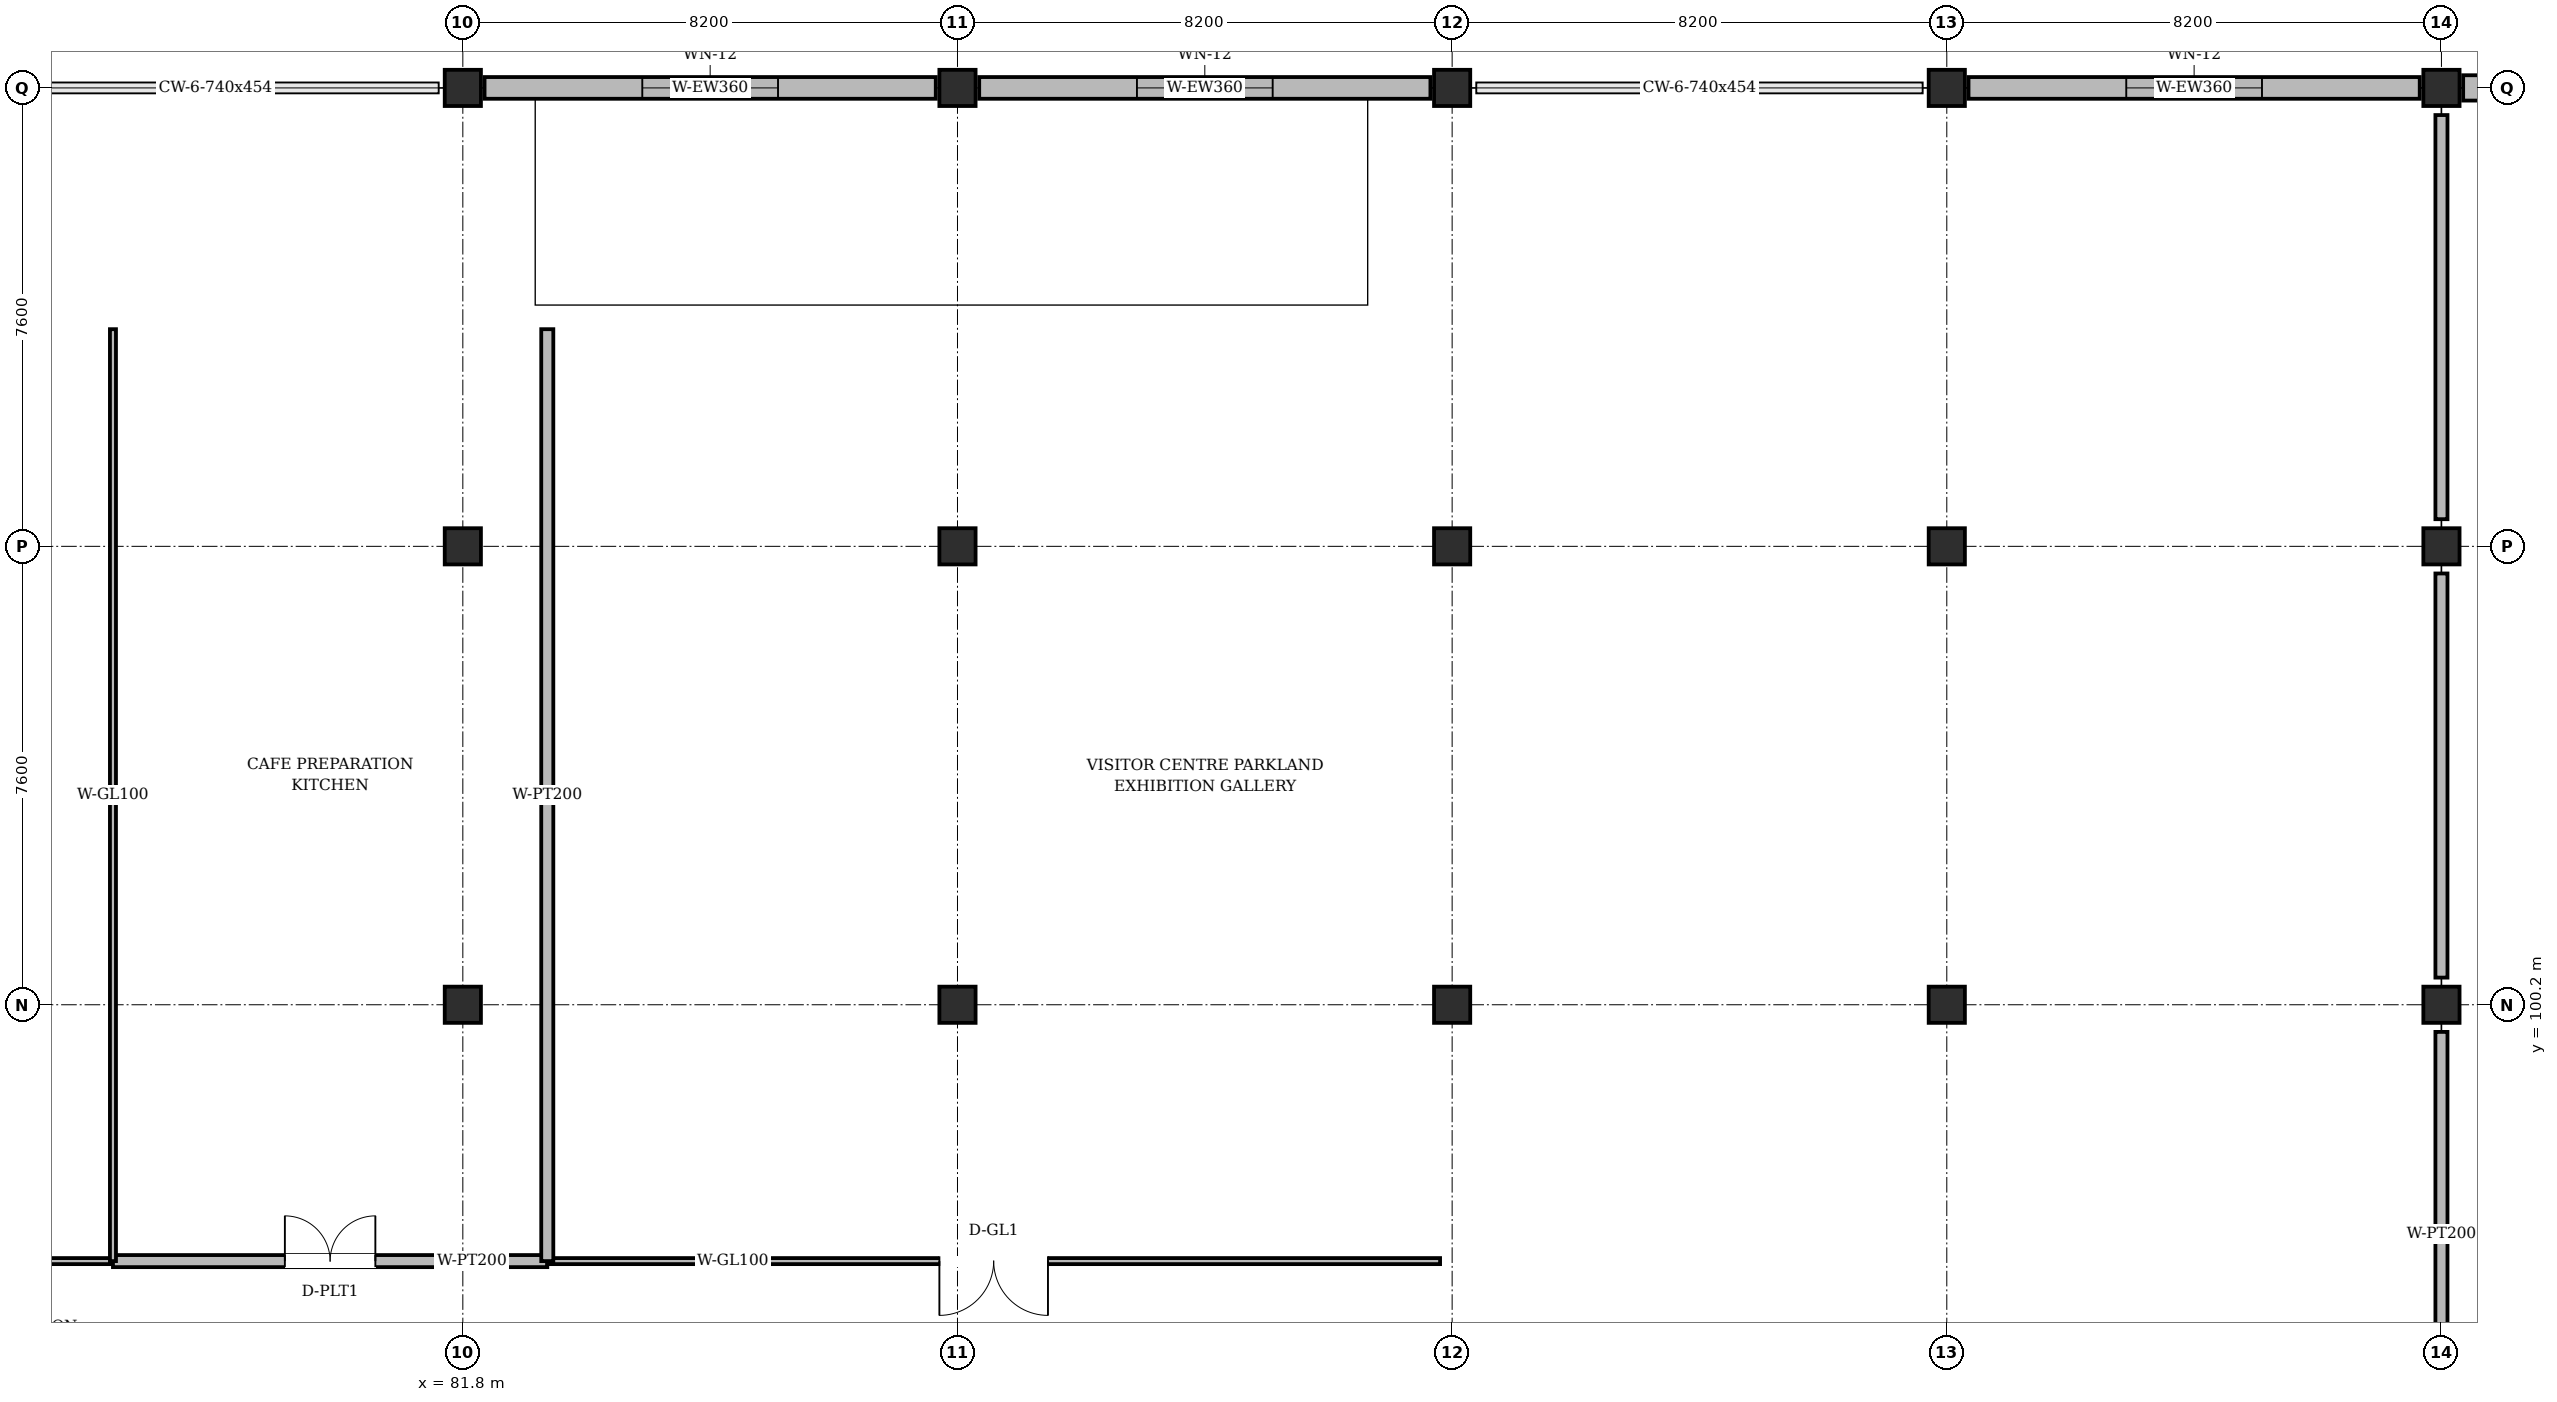
"""IFC4 building model, lengths in metres.
Left out: names, types, materials, properties, quantities, classifications, styles, units other than length and angle.
Written with IfcOpenShell. Run it as: python <this file> out.ifc"""

import sys

from ifc_helpers import new_model, si_unit, direction, frame, frame_2d, origin, origin_2d, place, context, subcontext, project, spatial, rectangle, extrude, element, fill, save


model = new_model("IFC4")
c1 = context("Model", 3, precision=1e-05, world=origin(), true_north=direction((0.0, 1.0)))
c2 = subcontext(c1, "Body", "Model", "MODEL_VIEW")
j1 = project(units=[si_unit("LENGTHUNIT", "METRE"), si_unit("PLANEANGLEUNIT", "RADIAN")], contexts=[c1])
p1 = place(None, origin())
s1 = spatial("IfcSite", under=j1, at=p1, CompositionType="ELEMENT")
p2 = place(p1, origin())
s2 = spatial("IfcBuilding", under=s1, at=p2, CompositionType="ELEMENT")
p3 = place(p2, origin())
s3 = spatial("IfcBuildingStorey", under=s2, at=p3, CompositionType="ELEMENT", Elevation=0.0)
for number, where, z_axis, x_axis in (
    (1, (81.8, 100.2, 0.0), (0.0, 0.0, 1.0), (1.0, 0.0, 0.0)),
    (2, (81.8, 107.8, 0.0), (0.0, 0.0, 1.0), (1.0, 0.0, 0.0)),
):
    element("IfcColumn", number, at=place(p3, frame(where, z_axis=z_axis, x_axis=x_axis)), inside=s3, PredefinedType="COLUMN", context=c2, shape_type="SweptSolid", body=[
        extrude(rectangle(XDim=0.6, YDim=0.6, at=origin_2d()), origin(), (0.0, 0.0, 1.0), 5.1),
    ])
p4 = place(p3, frame((81.8, 115.4, 0.0), z_axis=(0.0, 0.0, 1.0), x_axis=(1.0, 0.0, 0.0)))
e3 = element("IfcColumn", 3, at=p4, inside=s3, PredefinedType="COLUMN", context=c2, shape_type="SweptSolid", body=[
    extrude(rectangle(XDim=0.6, YDim=0.6, at=origin_2d()), origin(), (0.0, 0.0, 1.0), 5.145),
])
for number, where, z_axis, x_axis in (
    (4, (90.0, 100.2, 0.0), (0.0, 0.0, 1.0), (1.0, 0.0, 0.0)),
    (5, (90.0, 107.8, 0.0), (0.0, 0.0, 1.0), (1.0, 0.0, 0.0)),
):
    element("IfcColumn", number, at=place(p3, frame(where, z_axis=z_axis, x_axis=x_axis)), inside=s3, PredefinedType="COLUMN", context=c2, shape_type="SweptSolid", body=[
        extrude(rectangle(XDim=0.6, YDim=0.6, at=origin_2d()), origin(), (0.0, 0.0, 1.0), 5.1),
    ])
p5 = place(p3, frame((90.0, 115.4, 0.0), z_axis=(0.0, 0.0, 1.0), x_axis=(1.0, 0.0, 0.0)))
e6 = element("IfcColumn", 6, at=p5, inside=s3, PredefinedType="COLUMN", context=c2, shape_type="SweptSolid", body=[
    extrude(rectangle(XDim=0.6, YDim=0.6, at=origin_2d()), origin(), (0.0, 0.0, 1.0), 5.145),
])
for number, where, z_axis, x_axis in (
    (7, (98.2, 100.2, 0.0), (0.0, 0.0, 1.0), (1.0, 0.0, 0.0)),
    (8, (98.2, 107.8, 0.0), (0.0, 0.0, 1.0), (1.0, 0.0, 0.0)),
):
    element("IfcColumn", number, at=place(p3, frame(where, z_axis=z_axis, x_axis=x_axis)), inside=s3, PredefinedType="COLUMN", context=c2, shape_type="SweptSolid", body=[
        extrude(rectangle(XDim=0.6, YDim=0.6, at=origin_2d()), origin(), (0.0, 0.0, 1.0), 5.1),
    ])
p6 = place(p3, frame((98.2, 115.4, 0.0), z_axis=(0.0, 0.0, 1.0), x_axis=(1.0, 0.0, 0.0)))
e9 = element("IfcColumn", 9, at=p6, inside=s3, PredefinedType="COLUMN", context=c2, shape_type="SweptSolid", body=[
    extrude(rectangle(XDim=0.6, YDim=0.6, at=origin_2d()), origin(), (0.0, 0.0, 1.0), 5.145),
])
for number, where, z_axis, x_axis in (
    (10, (106.4, 100.2, 0.0), (0.0, 0.0, 1.0), (1.0, 0.0, 0.0)),
    (11, (106.4, 107.8, 0.0), (0.0, 0.0, 1.0), (1.0, 0.0, 0.0)),
):
    element("IfcColumn", number, at=place(p3, frame(where, z_axis=z_axis, x_axis=x_axis)), inside=s3, PredefinedType="COLUMN", context=c2, shape_type="SweptSolid", body=[
        extrude(rectangle(XDim=0.6, YDim=0.6, at=origin_2d()), origin(), (0.0, 0.0, 1.0), 5.1),
    ])
p7 = place(p3, frame((106.4, 115.4, 0.0), z_axis=(0.0, 0.0, 1.0), x_axis=(1.0, 0.0, 0.0)))
e12 = element("IfcColumn", 12, at=p7, inside=s3, PredefinedType="COLUMN", context=c2, shape_type="SweptSolid", body=[
    extrude(rectangle(XDim=0.6, YDim=0.6, at=origin_2d()), origin(), (0.0, 0.0, 1.0), 5.145),
])
p8 = place(p3, frame((114.6, 100.2, 0.0), z_axis=(0.0, 0.0, 1.0), x_axis=(1.0, 0.0, 0.0)))
e13 = element("IfcColumn", 13, at=p8, inside=s3, PredefinedType="COLUMN", context=c2, shape_type="SweptSolid", body=[
    extrude(rectangle(XDim=0.6, YDim=0.6, at=origin_2d()), origin(), (0.0, 0.0, 1.0), 5.1),
])
for number, where, z_axis, x_axis in (
    (14, (114.6, 107.8, 0.0), (0.0, 0.0, 1.0), (1.0, 0.0, 0.0)),
    (15, (114.6, 115.4, 0.0), (0.0, 0.0, 1.0), (1.0, 0.0, 0.0)),
):
    element("IfcColumn", number, at=place(p3, frame(where, z_axis=z_axis, x_axis=x_axis)), inside=s3, PredefinedType="COLUMN", context=c2, shape_type="SweptSolid", body=[
        extrude(rectangle(XDim=0.6, YDim=0.6, at=origin_2d()), origin(), (0.0, 0.0, 1.0), 5.145),
    ])
p9 = place(p3, frame((114.24, 115.4, 0.0), z_axis=(0.0, 0.0, 1.0), x_axis=(-1.0, 0.0, 0.0)))
e16 = element("IfcWall", 16, at=p9, inside=s3, PredefinedType="SOLIDWALL", context=c2, shape_type="SweptSolid", body=[
    extrude(rectangle(XDim=7.48, YDim=0.36, at=frame_2d((3.74, 0.0))), origin(), (0.0, 0.0, 1.0), 4.465),
])
p10 = place(p9, frame((2.615, 0.0, 0.95)))
e17 = element("IfcOpeningElement", 17, at=p10, cuts=e16, PredefinedType="OPENING", context=c2, shape_type="SweptSolid", body=[
    extrude(rectangle(XDim=2.25, YDim=2.1, at=frame_2d((1.125, 1.05))), frame((0.0, 0.192, 0.0), z_axis=(0.0, -1.0, 0.0), x_axis=(1.0, 0.0, 0.0)), (0.0, 0.0, 1.0), 0.384),
])
p11 = place(p3, frame((97.84, 115.4, 0.0), z_axis=(0.0, 0.0, 1.0), x_axis=(-1.0, 0.0, 0.0)))
e18 = element("IfcWall", 18, at=p11, inside=s3, PredefinedType="SOLIDWALL", context=c2, shape_type="SweptSolid", body=[
    extrude(rectangle(XDim=7.48, YDim=0.36, at=frame_2d((3.74, 0.0))), origin(), (0.0, 0.0, 1.0), 4.465),
])
p12 = place(p11, frame((2.615, 0.0, 0.95)))
e19 = element("IfcOpeningElement", 19, at=p12, cuts=e18, PredefinedType="OPENING", context=c2, shape_type="SweptSolid", body=[
    extrude(rectangle(XDim=2.25, YDim=2.1, at=frame_2d((1.125, 1.05))), frame((0.0, 0.192, 0.0), z_axis=(0.0, -1.0, 0.0), x_axis=(1.0, 0.0, 0.0)), (0.0, 0.0, 1.0), 0.384),
])
p13 = place(p3, frame((89.64, 115.4, 0.0), z_axis=(0.0, 0.0, 1.0), x_axis=(-1.0, 0.0, 0.0)))
e20 = element("IfcWall", 20, at=p13, inside=s3, PredefinedType="SOLIDWALL", context=c2, shape_type="SweptSolid", body=[
    extrude(rectangle(XDim=7.48, YDim=0.36, at=frame_2d((3.74, 0.0))), origin(), (0.0, 0.0, 1.0), 4.465),
])
p14 = place(p13, frame((2.615, 0.0, 0.95)))
e21 = element("IfcOpeningElement", 21, at=p14, cuts=e20, PredefinedType="OPENING", context=c2, shape_type="SweptSolid", body=[
    extrude(rectangle(XDim=2.25, YDim=2.1, at=frame_2d((1.125, 1.05))), frame((0.0, 0.192, 0.0), z_axis=(0.0, -1.0, 0.0), x_axis=(1.0, 0.0, 0.0)), (0.0, 0.0, 1.0), 0.384),
])
p15 = place(p3, frame((122.44, 115.4, 0.0), z_axis=(0.0, 0.0, 1.0), x_axis=(-1.0, 0.0, 0.0)))
e22 = element("IfcWall", 22, at=p15, inside=s3, PredefinedType="SOLIDWALL", context=c2, shape_type="SweptSolid", body=[
    extrude(rectangle(XDim=7.48, YDim=0.42, at=frame_2d((3.74, 0.0))), origin(), (0.0, 0.0, 1.0), 4.53),
])
p16 = place(p15, frame((2.415, 0.0, 0.95)))
e23 = element("IfcOpeningElement", 23, at=p16, cuts=e22, PredefinedType="OPENING", context=c2, shape_type="SweptSolid", body=[
    extrude(rectangle(XDim=2.65, YDim=1.5, at=frame_2d((1.325, 0.75))), frame((0.0, 0.222, 0.0), z_axis=(0.0, -1.0, 0.0), x_axis=(1.0, 0.0, 0.0)), (0.0, 0.0, 1.0), 0.444),
])
p17 = place(p3, frame((114.6, 93.05, 0.0), z_axis=(0.0, 0.0, 1.0), x_axis=(0.0, 1.0, 0.0)))
e24 = element("IfcWall", 24, at=p17, inside=s3, PredefinedType="PARTITIONING", context=c2, shape_type="SweptSolid", body=[
    extrude(rectangle(XDim=6.7, YDim=0.2, at=frame_2d((3.35, 0.0))), origin(), (0.0, 0.0, 1.0), 4.335),
])
p18 = place(p3, frame((114.6, 100.65, 0.0), z_axis=(0.0, 0.0, 1.0), x_axis=(0.0, 1.0, 0.0)))
e25 = element("IfcWall", 25, at=p18, inside=s3, PredefinedType="PARTITIONING", context=c2, shape_type="SweptSolid", body=[
    extrude(rectangle(XDim=6.7, YDim=0.2, at=frame_2d((3.35, 0.0))), origin(), (0.0, 0.0, 1.0), 4.335),
])
p19 = place(p3, frame((114.6, 108.25, 0.0), z_axis=(0.0, 0.0, 1.0), x_axis=(0.0, 1.0, 0.0)))
e26 = element("IfcWall", 26, at=p19, inside=s3, PredefinedType="PARTITIONING", context=c2, shape_type="SweptSolid", body=[
    extrude(rectangle(XDim=6.7, YDim=0.2, at=frame_2d((3.35, 0.0))), origin(), (0.0, 0.0, 1.0), 4.53),
])
p20 = place(p3, frame((69.7, 95.95, 0.0), z_axis=(0.0, 0.0, 1.0), x_axis=(1.0, 0.0, 0.0)))
e27 = element("IfcWall", 27, at=p20, inside=s3, PredefinedType="PARTITIONING", context=c2, shape_type="SweptSolid", body=[
    extrude(rectangle(XDim=6.3, YDim=0.1, at=frame_2d((3.15, 0.0))), origin(), (0.0, 0.0, 1.0), 5.005),
])
p21 = place(p3, frame((76.0, 95.95, 0.0), z_axis=(0.0, 0.0, 1.0), x_axis=(1.0, 0.0, 0.0)))
e28 = element("IfcWall", 28, at=p21, inside=s3, PredefinedType="PARTITIONING", context=c2, shape_type="SweptSolid", body=[
    extrude(rectangle(XDim=7.2, YDim=0.2, at=frame_2d((3.6, 0.0))), origin(), (0.0, 0.0, 1.0), 5.005),
])
p22 = place(p21, frame((2.85, 0.0, 0.0)))
e29 = element("IfcOpeningElement", 29, at=p22, cuts=e28, PredefinedType="OPENING", context=c2, shape_type="SweptSolid", body=[
    extrude(rectangle(XDim=1.5, YDim=2.2, at=frame_2d((0.75, 1.1))), frame((0.0, 0.112, 0.0), z_axis=(0.0, -1.0, 0.0), x_axis=(1.0, 0.0, 0.0)), (0.0, 0.0, 1.0), 0.224),
])
p23 = place(p3, frame((83.2, 95.95, 0.0), z_axis=(0.0, 0.0, 1.0), x_axis=(1.0, 0.0, 0.0)))
e30 = element("IfcWall", 30, at=p23, inside=s3, PredefinedType="PARTITIONING", context=c2, shape_type="SweptSolid", body=[
    extrude(rectangle(XDim=14.8, YDim=0.1, at=frame_2d((7.4, 0.0))), origin(), (0.0, 0.0, 1.0), 5.005),
])
p24 = place(p23, frame((6.5, 0.0, 0.0)))
e31 = element("IfcOpeningElement", 31, at=p24, cuts=e30, PredefinedType="OPENING", context=c2, shape_type="SweptSolid", body=[
    extrude(rectangle(XDim=1.8, YDim=2.4, at=frame_2d((0.9, 1.2))), frame((0.0, 0.062, 0.0), z_axis=(0.0, -1.0, 0.0), x_axis=(1.0, 0.0, 0.0)), (0.0, 0.0, 1.0), 0.124),
])
p25 = place(p3, frame((76.0, 111.4, 0.0), z_axis=(0.0, 0.0, 1.0), x_axis=(0.0, -1.0, 0.0)))
e32 = element("IfcWall", 32, at=p25, inside=s3, PredefinedType="PARTITIONING", context=c2, shape_type="SweptSolid", body=[
    extrude(rectangle(XDim=15.45, YDim=0.1, at=frame_2d((7.725, 0.0))), origin(), (0.0, 0.0, 1.0), 5.005),
])
p26 = place(p3, frame((83.2, 111.4, 0.0), z_axis=(0.0, 0.0, 1.0), x_axis=(0.0, -1.0, 0.0)))
e33 = element("IfcWall", 33, at=p26, inside=s3, PredefinedType="PARTITIONING", context=c2, shape_type="SweptSolid", body=[
    extrude(rectangle(XDim=15.45, YDim=0.2, at=frame_2d((7.725, 0.0))), origin(), (0.0, 0.0, 1.0), 5.005),
])
p27 = place(p10, origin())
e34 = element("IfcWindow", 34, at=p27, inside=s3, PartitioningType="DOUBLE_PANEL_VERTICAL", PredefinedType="WINDOW", context=c2, shape_type="SweptSolid", body=[
    extrude(rectangle(XDim=2.25, YDim=2.1, at=frame_2d((1.125, 1.05))), frame((0.0, 0.03, 0.0), z_axis=(0.0, -1.0, 0.0), x_axis=(1.0, 0.0, 0.0)), (0.0, 0.0, 1.0), 0.06),
])
fill(e17, e34)
p28 = place(p12, origin())
e35 = element("IfcWindow", 35, at=p28, inside=s3, PartitioningType="DOUBLE_PANEL_VERTICAL", PredefinedType="WINDOW", context=c2, shape_type="SweptSolid", body=[
    extrude(rectangle(XDim=2.25, YDim=2.1, at=frame_2d((1.125, 1.05))), frame((0.0, 0.03, 0.0), z_axis=(0.0, -1.0, 0.0), x_axis=(1.0, 0.0, 0.0)), (0.0, 0.0, 1.0), 0.06),
])
fill(e19, e35)
p29 = place(p14, origin())
e36 = element("IfcWindow", 36, at=p29, inside=s3, PartitioningType="DOUBLE_PANEL_VERTICAL", PredefinedType="WINDOW", context=c2, shape_type="SweptSolid", body=[
    extrude(rectangle(XDim=2.25, YDim=2.1, at=frame_2d((1.125, 1.05))), frame((0.0, 0.03, 0.0), z_axis=(0.0, -1.0, 0.0), x_axis=(1.0, 0.0, 0.0)), (0.0, 0.0, 1.0), 0.06),
])
fill(e21, e36)
p30 = place(p22, origin())
e37 = element("IfcDoor", 37, at=p30, inside=s3, OperationType="DOUBLE_DOOR_SINGLE_SWING", PredefinedType="DOOR", context=c2, shape_type="SweptSolid", body=[
    extrude(rectangle(XDim=1.5, YDim=2.2, at=frame_2d((0.75, 1.1))), frame((0.0, 0.025, 0.0), z_axis=(0.0, -1.0, 0.0), x_axis=(1.0, 0.0, 0.0)), (0.0, 0.0, 1.0), 0.05),
])
fill(e29, e37)
p31 = place(p24, frame((1.8, 0.0, 0.0), z_axis=(0.0, 0.0, 1.0), x_axis=(-1.0, 0.0, 0.0)))
e38 = element("IfcDoor", 38, at=p31, inside=s3, OperationType="DOUBLE_DOOR_SINGLE_SWING", PredefinedType="DOOR", context=c2, shape_type="SweptSolid", body=[
    extrude(rectangle(XDim=1.8, YDim=2.4, at=frame_2d((0.9, 1.2))), frame((0.0, 0.025, 0.0), z_axis=(0.0, -1.0, 0.0), x_axis=(1.0, 0.0, 0.0)), (0.0, 0.0, 1.0), 0.05),
])
fill(e31, e38)
save(model, sys.argv[1])
